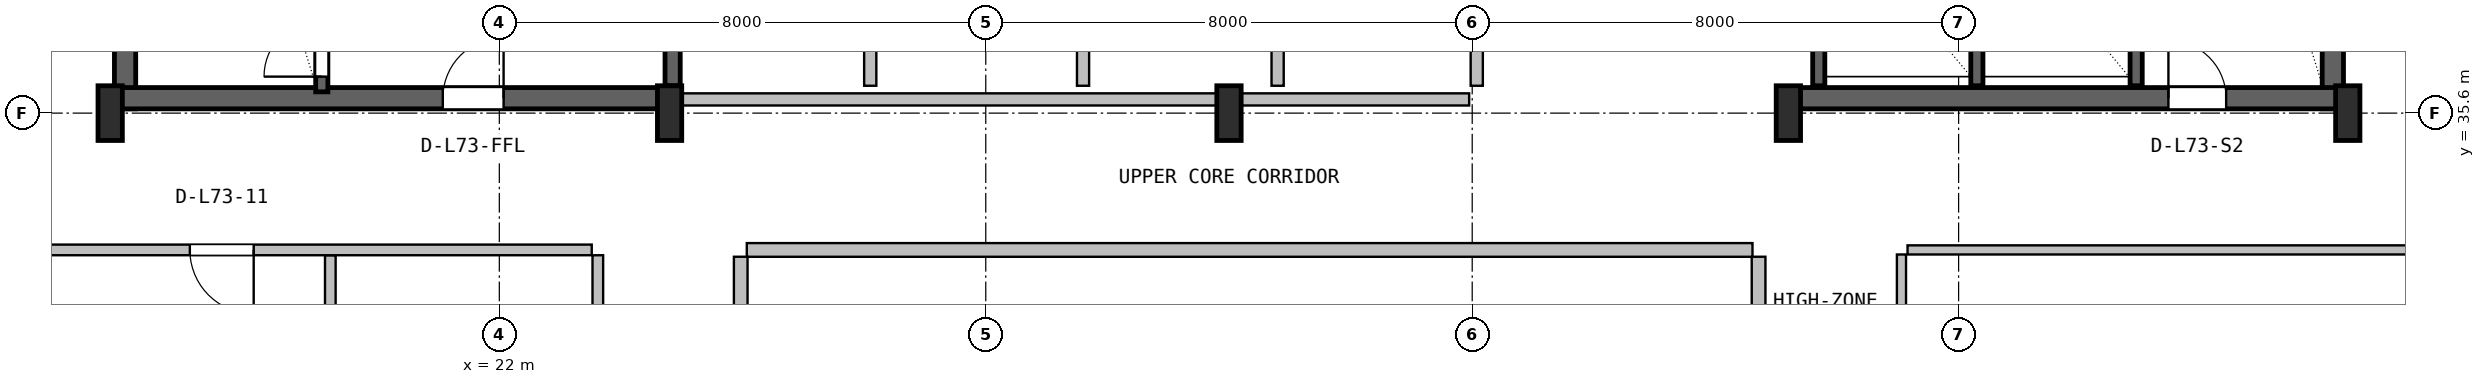
"""IFC4 building model, lengths in metres.
Left out: names, types, materials, properties, quantities, classifications, styles, units other than length and angle.
Written with IfcOpenShell. Run it as: python <this file> out.ifc"""

import sys

from ifc_helpers import new_model, si_unit, direction, frame, frame_2d, origin, origin_2d, place, context, subcontext, project, spatial, rectangle, i_section, extrude, source, transform, mapped, element, fill, save


model = new_model("IFC4")
c1 = context("Model", 3, precision=1e-05, world=origin(), true_north=direction((0.0, 1.0)))
c2 = subcontext(c1, "Body", "Model", "MODEL_VIEW")
j1 = project(units=[si_unit("LENGTHUNIT", "METRE"), si_unit("PLANEANGLEUNIT", "RADIAN")], contexts=[c1])
p1 = place(None, origin())
s1 = spatial("IfcSite", under=j1, at=p1, CompositionType="ELEMENT")
p2 = place(p1, origin())
s2 = spatial("IfcBuilding", under=s1, at=p2, CompositionType="ELEMENT")
p3 = place(p2, frame((0.0, 0.0, 292.6)))
s3 = spatial("IfcBuildingStorey", under=s2, at=p3, CompositionType="ELEMENT", Elevation=292.6)
for number, where, z_axis, x_axis in (
    (1, (15.845, 35.67, 0.0), (0.0, 0.0, 1.0), (0.0, 1.0, 0.0)),
    (2, (52.155, 35.67, 0.0), (0.0, 0.0, 1.0), (0.0, 1.0, 0.0)),
):
    element("IfcWall", number, at=place(p3, frame(where, z_axis=z_axis, x_axis=x_axis)), inside=s3, PredefinedType="SHEAR", context=c2, shape_type="SweptSolid", body=[
        extrude(rectangle(XDim=11.13, YDim=0.35, at=frame_2d((5.565, 0.0))), origin(), (0.0, 0.0, 1.0), 3.55),
    ])
p4 = place(p3, frame((15.67, 35.845, 0.0), z_axis=(0.0, 0.0, 1.0), x_axis=(1.0, 0.0, 0.0)))
e3 = element("IfcWall", 3, at=p4, inside=s3, PredefinedType="SHEAR", context=c2, shape_type="SweptSolid", body=[
    extrude(rectangle(XDim=9.13, YDim=0.35, at=frame_2d((4.565, 0.0))), origin(), (0.0, 0.0, 1.0), 3.55),
])
p5 = place(p4, frame((5.4, 0.0, 0.0)))
e4 = element("IfcOpeningElement", 4, at=p5, cuts=e3, PredefinedType="OPENING", context=c2, shape_type="SweptSolid", body=[
    extrude(rectangle(XDim=1.0, YDim=2.1, at=frame_2d((0.5, 1.05))), frame((0.0, 0.185, 0.0), z_axis=(0.0, -1.0, 0.0), x_axis=(1.0, 0.0, 0.0)), (0.0, 0.0, 1.0), 0.37),
])
p6 = place(p3, frame((43.2, 35.845, 0.0), z_axis=(0.0, 0.0, 1.0), x_axis=(1.0, 0.0, 0.0)))
e5 = element("IfcWall", 5, at=p6, inside=s3, PredefinedType="SHEAR", context=c2, shape_type="SweptSolid", body=[
    extrude(rectangle(XDim=9.13, YDim=0.35, at=frame_2d((4.565, 0.0))), origin(), (0.0, 0.0, 1.0), 3.55),
])
p7 = place(p6, frame((6.25, 0.0, 0.0)))
e6 = element("IfcOpeningElement", 6, at=p7, cuts=e5, PredefinedType="OPENING", context=c2, shape_type="SweptSolid", body=[
    extrude(rectangle(XDim=0.95, YDim=2.1, at=frame_2d((0.475, 1.05))), frame((0.0, 0.185, 0.0), z_axis=(0.0, -1.0, 0.0), x_axis=(1.0, 0.0, 0.0)), (0.0, 0.0, 1.0), 0.37),
])
m1 = source(origin(), c2, "Body", "SweptSolid", [
    extrude(i_section(OverallWidth=0.4, OverallDepth=0.9, WebThickness=0.016, FlangeThickness=0.028, FilletRadius=0.016, at=origin_2d()), origin(), (0.0, 0.0, 1.0), 3.8),
])
for number, where, z_axis, x_axis in (
    (7, (15.6, 35.6, 0.0), (0.0, 0.0, 1.0), (1.0, 0.0, 0.0)),
    (8, (24.8, 35.6, 0.0), (0.0, 0.0, 1.0), (1.0, 0.0, 0.0)),
    (9, (34.0, 35.6, 0.0), (0.0, 0.0, 1.0), (1.0, 0.0, 0.0)),
    (10, (43.2, 35.6, 0.0), (0.0, 0.0, 1.0), (1.0, 0.0, 0.0)),
    (11, (52.4, 35.6, 0.0), (0.0, 0.0, 1.0), (1.0, 0.0, 0.0)),
):
    element("IfcColumn", number, at=place(p3, frame(where, z_axis=z_axis, x_axis=x_axis)), inside=s3, PredefinedType="COLUMN", context=c2, shape_type="MappedRepresentation", body=[
        mapped(m1, transform((0.0, 0.0, 0.0), x_axis=(1.0, 0.0, 0.0), y_axis=(0.0, 1.0, 0.0), z_axis=(0.0, 0.0, 1.0), scale=1.0)),
    ])
p8 = place(p3, frame((19.08, 35.95, 0.0), z_axis=(0.0, 0.0, 1.0), x_axis=(0.0, 1.0, 0.0)))
e12 = element("IfcWall", 12, at=p8, inside=s3, PredefinedType="SHEAR", context=c2, shape_type="SweptSolid", body=[
    extrude(rectangle(XDim=9.65, YDim=0.2, at=frame_2d((4.825, 0.0))), origin(), (0.0, 0.0, 1.0), 3.55),
])
p9 = place(p8, frame((0.25, 0.0, 0.0)))
e13 = element("IfcOpeningElement", 13, at=p9, cuts=e12, PredefinedType="OPENING", context=c2, shape_type="SweptSolid", body=[
    extrude(rectangle(XDim=0.95, YDim=2.1, at=frame_2d((0.475, 1.05))), frame((0.0, 0.11, 0.0), z_axis=(0.0, -1.0, 0.0), x_axis=(1.0, 0.0, 0.0)), (0.0, 0.0, 1.0), 0.22),
])
p10 = place(p3, frame((24.85, 36.05, 0.0), z_axis=(0.0, 0.0, 1.0), x_axis=(0.0, 1.0, 0.0)))
e14 = element("IfcWall", 14, at=p10, inside=s3, PredefinedType="SHEAR", context=c2, shape_type="SweptSolid", body=[
    extrude(rectangle(XDim=10.45, YDim=0.25, at=frame_2d((5.225, 0.0))), origin(), (0.0, 0.0, 1.0), 3.55),
])
p11 = place(p3, frame((48.92, 36.05, 0.0), z_axis=(0.0, 0.0, 1.0), x_axis=(0.0, 1.0, 0.0)))
e15 = element("IfcWall", 15, at=p11, inside=s3, PredefinedType="SHEAR", context=c2, shape_type="SweptSolid", body=[
    extrude(rectangle(XDim=10.5, YDim=0.2, at=frame_2d((5.25, 0.0))), origin(), (0.0, 0.0, 1.0), 3.55),
])
for number, where, z_axis, x_axis in (
    (16, (43.7, 36.05, 0.0), (0.0, 0.0, 1.0), (0.0, 1.0, 0.0)),
    (17, (46.3, 36.05, 0.0), (0.0, 0.0, 1.0), (0.0, 1.0, 0.0)),
):
    element("IfcWall", number, at=place(p3, frame(where, z_axis=z_axis, x_axis=x_axis)), inside=s3, PredefinedType="SHEAR", context=c2, shape_type="SweptSolid", body=[
        extrude(rectangle(XDim=3.05, YDim=0.2, at=frame_2d((1.525, 0.0))), origin(), (0.0, 0.0, 1.0), 3.55),
    ])
p12 = place(p3, frame((25.0, 35.825, 0.0), z_axis=(0.0, 0.0, 1.0), x_axis=(1.0, 0.0, 0.0)))
e18 = element("IfcWall", 18, at=p12, inside=s3, PredefinedType="SOLIDWALL", context=c2, shape_type="SweptSolid", body=[
    extrude(rectangle(XDim=12.95, YDim=0.2, at=frame_2d((6.475, 0.0))), origin(), (0.0, 0.0, 1.0), 2.575),
])
for number, where, z_axis, x_axis in (
    (19, (28.1, 36.05, 0.0), (0.0, 0.0, 1.0), (0.0, 1.0, 0.0)),
    (20, (31.6, 36.05, 0.0), (0.0, 0.0, 1.0), (0.0, 1.0, 0.0)),
):
    element("IfcWall", number, at=place(p3, frame(where, z_axis=z_axis, x_axis=x_axis)), inside=s3, PredefinedType="PLUMBINGWALL", context=c2, shape_type="SweptSolid", body=[
        extrude(rectangle(XDim=3.1, YDim=0.2, at=frame_2d((1.55, 0.0))), origin(), (0.0, 0.0, 1.0), 3.53),
    ])
for number, where, z_axis, x_axis in (
    (21, (34.8, 36.05, 0.0), (0.0, 0.0, 1.0), (0.0, 1.0, 0.0)),
    (22, (38.075, 36.05, 0.0), (0.0, 0.0, 1.0), (0.0, 1.0, 0.0)),
):
    element("IfcWall", number, at=place(p3, frame(where, z_axis=z_axis, x_axis=x_axis)), inside=s3, PredefinedType="SOLIDWALL", context=c2, shape_type="SweptSolid", body=[
        extrude(rectangle(XDim=3.1, YDim=0.2, at=frame_2d((1.55, 0.0))), origin(), (0.0, 0.0, 1.0), 3.53),
    ])
p13 = place(p3, frame((19.22, 20.827, 0.0), z_axis=(0.0, 0.0, 1.0), x_axis=(0.0, 1.0, 0.0)))
e23 = element("IfcWall", 23, at=p13, inside=s3, PredefinedType="PARTITIONING", context=c2, shape_type="SweptSolid", body=[
    extrude(rectangle(XDim=12.436, YDim=0.175, at=frame_2d((6.218, 0.0))), origin(), (0.0, 0.0, 1.0), 3.222),
])
p14 = place(p3, frame((12.18, 33.35, 0.0), z_axis=(0.0, 0.0, 1.0), x_axis=(1.0, 0.0, 0.0)))
e24 = element("IfcWall", 24, at=p14, inside=s3, PredefinedType="PARTITIONING", context=c2, shape_type="SweptSolid", body=[
    extrude(rectangle(XDim=11.34, YDim=0.175, at=frame_2d((5.67, 0.0))), origin(), (0.0, 0.0, 1.0), 3.171),
])
p15 = place(p14, frame((4.73, 0.0, 0.0)))
e25 = element("IfcOpeningElement", 25, at=p15, cuts=e24, PredefinedType="OPENING", context=c2, shape_type="SweptSolid", body=[
    extrude(rectangle(XDim=1.05, YDim=2.1, at=frame_2d((0.525, 1.05))), frame((0.0, 0.098, 0.0), z_axis=(0.0, -1.0, 0.0), x_axis=(1.0, 0.0, 0.0)), (0.0, 0.0, 1.0), 0.195),
])
p16 = place(p3, frame((23.62, 20.827, 0.0), z_axis=(0.0, 0.0, 1.0), x_axis=(0.0, 1.0, 0.0)))
e26 = element("IfcWall", 26, at=p16, inside=s3, PredefinedType="PARTITIONING", context=c2, shape_type="SweptSolid", body=[
    extrude(rectangle(XDim=12.436, YDim=0.175, at=frame_2d((6.218, 0.0))), origin(), (0.0, 0.0, 1.0), 3.222),
])
p17 = place(p16, frame((5.693, 0.0, 0.0)))
e27 = element("IfcOpeningElement", 27, at=p17, cuts=e26, PredefinedType="OPENING", context=c2, shape_type="SweptSolid", body=[
    extrude(rectangle(XDim=1.05, YDim=2.1, at=frame_2d((0.525, 1.05))), frame((0.0, 0.098, 0.0), z_axis=(0.0, -1.0, 0.0), x_axis=(1.0, 0.0, 0.0)), (0.0, 0.0, 1.0), 0.195),
])
p18 = place(p3, frame((42.71, 23.203, 0.0), z_axis=(0.0, 0.0, 1.0), x_axis=(0.0, 1.0, 0.0)))
e28 = element("IfcWall", 28, at=p18, inside=s3, PredefinedType="PARTITIONING", context=c2, shape_type="SweptSolid", body=[
    extrude(rectangle(XDim=10.035, YDim=0.225, at=frame_2d((5.018, 0.0))), origin(), (0.0, 0.0, 1.0), 2.981),
])
p19 = place(p3, frame((26.07, 33.35, 0.0), z_axis=(0.0, 0.0, 1.0), x_axis=(1.0, 0.0, 0.0)))
e29 = element("IfcWall", 29, at=p19, inside=s3, PredefinedType="PARTITIONING", context=c2, shape_type="SweptSolid", body=[
    extrude(rectangle(XDim=16.54, YDim=0.225, at=frame_2d((8.27, 0.0))), origin(), (0.0, 0.0, 1.0), 2.981),
])
p20 = place(p3, frame((25.97, 23.203, 0.0), z_axis=(0.0, 0.0, 1.0), x_axis=(0.0, 1.0, 0.0)))
e30 = element("IfcWall", 30, at=p20, inside=s3, PredefinedType="PARTITIONING", context=c2, shape_type="SweptSolid", body=[
    extrude(rectangle(XDim=10.035, YDim=0.225, at=frame_2d((5.018, 0.0))), origin(), (0.0, 0.0, 1.0), 2.981),
])
p21 = place(p3, frame((45.06, 20.827, 0.0), z_axis=(0.0, 0.0, 1.0), x_axis=(0.0, 1.0, 0.0)))
e31 = element("IfcWall", 31, at=p21, inside=s3, PredefinedType="PARTITIONING", context=c2, shape_type="SweptSolid", body=[
    extrude(rectangle(XDim=12.448, YDim=0.15, at=frame_2d((6.224, 0.0))), origin(), (0.0, 0.0, 1.0), 3.222),
])
p22 = place(p21, frame((2.068, 0.0, 0.0)))
e32 = element("IfcOpeningElement", 32, at=p22, cuts=e31, PredefinedType="OPENING", context=c2, shape_type="SweptSolid", body=[
    extrude(rectangle(XDim=0.88, YDim=2.06, at=frame_2d((0.44, 1.03))), frame((0.0, 0.085, 0.0), z_axis=(0.0, -1.0, 0.0), x_axis=(1.0, 0.0, 0.0)), (0.0, 0.0, 1.0), 0.17),
])
p23 = place(p21, frame((8.353, 0.0, 0.0)))
e33 = element("IfcOpeningElement", 33, at=p23, cuts=e31, PredefinedType="OPENING", context=c2, shape_type="SweptSolid", body=[
    extrude(rectangle(XDim=0.92, YDim=2.08, at=frame_2d((0.46, 1.04))), frame((0.0, 0.085, 0.0), z_axis=(0.0, -1.0, 0.0), x_axis=(1.0, 0.0, 0.0)), (0.0, 0.0, 1.0), 0.17),
])
p24 = place(p3, frame((45.16, 33.35, 0.0), z_axis=(0.0, 0.0, 1.0), x_axis=(1.0, 0.0, 0.0)))
e34 = element("IfcWall", 34, at=p24, inside=s3, PredefinedType="PARTITIONING", context=c2, shape_type="SweptSolid", body=[
    extrude(rectangle(XDim=10.66, YDim=0.15, at=frame_2d((5.33, 0.0))), origin(), (0.0, 0.0, 1.0), 3.171),
])
m2 = source(origin(), c2, "Body", "SweptSolid", [
    extrude(rectangle(XDim=0.95, YDim=2.1, at=frame_2d((0.475, 1.05))), frame((0.0, 0.025, 0.0), z_axis=(0.0, -1.0, 0.0), x_axis=(1.0, 0.0, 0.0)), (0.0, 0.0, 1.0), 0.05),
])
p25 = place(p9, origin())
e35 = element("IfcDoor", 35, at=p25, inside=s3, OperationType="SINGLE_SWING_LEFT", PredefinedType="DOOR", context=c2, shape_type="MappedRepresentation", body=[
    mapped(m2, transform((0.0, 0.0, 0.0), x_axis=(1.0, 0.0, 0.0), y_axis=(0.0, 1.0, 0.0), z_axis=(0.0, 0.0, 1.0), scale=1.0)),
])
fill(e13, e35)
m3 = source(origin(), c2, "Body", "SweptSolid", [
    extrude(rectangle(XDim=1.0, YDim=2.1, at=frame_2d((0.5, 1.05))), frame((0.0, 0.025, 0.0), z_axis=(0.0, -1.0, 0.0), x_axis=(1.0, 0.0, 0.0)), (0.0, 0.0, 1.0), 0.05),
])
p26 = place(p5, origin())
e36 = element("IfcDoor", 36, at=p26, inside=s3, OperationType="SINGLE_SWING_RIGHT", PredefinedType="DOOR", context=c2, shape_type="MappedRepresentation", body=[
    mapped(m3, transform((0.0, 0.0, 0.0), x_axis=(1.0, 0.0, 0.0), y_axis=(0.0, 1.0, 0.0), z_axis=(0.0, 0.0, 1.0), scale=1.0)),
])
fill(e4, e36)
p27 = place(p7, origin())
e37 = element("IfcDoor", 37, at=p27, inside=s3, OperationType="SINGLE_SWING_LEFT", PredefinedType="DOOR", context=c2, shape_type="MappedRepresentation", body=[
    mapped(m2, transform((0.0, 0.0, 0.0), x_axis=(1.0, 0.0, 0.0), y_axis=(0.0, 1.0, 0.0), z_axis=(0.0, 0.0, 1.0), scale=1.0)),
])
fill(e6, e37)
m4 = source(origin(), c2, "Body", "SweptSolid", [
    extrude(rectangle(XDim=1.05, YDim=2.1, at=frame_2d((0.525, 1.05))), frame((0.0, 0.025, 0.0), z_axis=(0.0, -1.0, 0.0), x_axis=(1.0, 0.0, 0.0)), (0.0, 0.0, 1.0), 0.05),
])
p28 = place(p15, frame((1.05, 0.0, 0.0), z_axis=(0.0, 0.0, 1.0), x_axis=(-1.0, 0.0, 0.0)))
e38 = element("IfcDoor", 38, at=p28, inside=s3, OperationType="SINGLE_SWING_RIGHT", PredefinedType="DOOR", context=c2, shape_type="MappedRepresentation", body=[
    mapped(m4, transform((0.0, 0.0, 0.0), x_axis=(1.0, 0.0, 0.0), y_axis=(0.0, 1.0, 0.0), z_axis=(0.0, 0.0, 1.0), scale=1.0)),
])
fill(e25, e38)
save(model, sys.argv[1])
